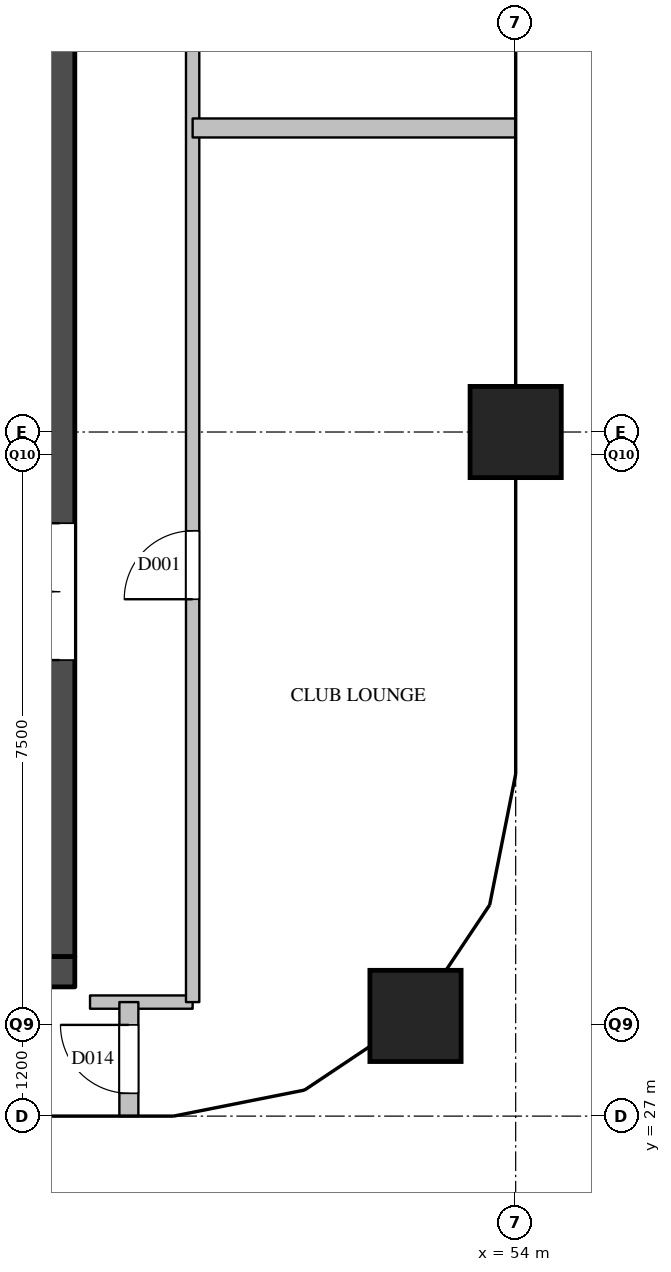
"""IFC4 building model, lengths in metres.
Left out: names, types, materials, properties, quantities, classifications, styles, units other than length and angle.
Written with IfcOpenShell. Run it as: python <this file> out.ifc"""

import sys

from ifc_helpers import new_model, si_unit, direction, frame, frame_2d, origin, origin_2d, place, context, subcontext, project, spatial, rectangle, extrude, element, fill, save


model = new_model("IFC4")
c1 = context("Model", 3, precision=1e-05, world=origin(), true_north=direction((0.0, 1.0)))
c2 = subcontext(c1, "Body", "Model", "MODEL_VIEW")
j1 = project(units=[si_unit("LENGTHUNIT", "METRE"), si_unit("PLANEANGLEUNIT", "RADIAN")], contexts=[c1])
p1 = place(None, origin())
s1 = spatial("IfcSite", under=j1, at=p1, CompositionType="ELEMENT")
p2 = place(p1, origin())
s2 = spatial("IfcBuilding", under=s1, at=p2, CompositionType="ELEMENT")
p3 = place(p2, frame((0.0, 0.0, 261.8)))
s3 = spatial("IfcBuildingStorey", under=s2, at=p3, CompositionType="ELEMENT", Elevation=261.8)
for number, where, z_axis, x_axis in (
    (1, (52.682, 28.318, 0.0), (0.0, 0.0, 1.0), (1.0, 0.0, 0.0)),
    (2, (54.0, 36.0, 0.0), (0.0, 0.0, 1.0), (1.0, 0.0, 0.0)),
):
    element("IfcColumn", number, at=place(p3, frame(where, z_axis=z_axis, x_axis=x_axis)), inside=s3, PredefinedType="COLUMN", context=c2, shape_type="SweptSolid", body=[
        extrude(rectangle(XDim=1.2, YDim=1.2, at=origin_2d()), origin(), (0.0, 0.0, 1.0), 3.9),
    ])
p4 = place(p3, frame((36.2, 28.9, 0.0), z_axis=(0.0, 0.0, 1.0), x_axis=(1.0, 0.0, 0.0)))
e3 = element("IfcWall", 3, at=p4, inside=s3, PredefinedType="SHEAR", context=c2, shape_type="SweptSolid", body=[
    extrude(rectangle(XDim=12.0, YDim=0.4, at=frame_2d((6.0, 0.0))), origin(), (0.0, 0.0, 1.0), 3.6),
])
p5 = place(p4, frame((0.85, 0.0, 0.0)))
e4 = element("IfcOpeningElement", 4, at=p5, cuts=e3, PredefinedType="OPENING", context=c2, shape_type="SweptSolid", body=[
    extrude(rectangle(XDim=1.2, YDim=2.1, at=frame_2d((0.6, 1.05))), frame((0.0, 0.21, 0.0), z_axis=(0.0, -1.0, 0.0), x_axis=(1.0, 0.0, 0.0)), (0.0, 0.0, 1.0), 0.42),
])
p6 = place(p4, frame((2.95, 0.0, 0.0)))
e5 = element("IfcOpeningElement", 5, at=p6, cuts=e3, PredefinedType="OPENING", context=c2, shape_type="SweptSolid", body=[
    extrude(rectangle(XDim=1.2, YDim=2.1, at=frame_2d((0.6, 1.05))), frame((0.0, 0.21, 0.0), z_axis=(0.0, -1.0, 0.0), x_axis=(1.0, 0.0, 0.0)), (0.0, 0.0, 1.0), 0.42),
])
p7 = place(p4, frame((5.05, 0.0, 0.0)))
e6 = element("IfcOpeningElement", 6, at=p7, cuts=e3, PredefinedType="OPENING", context=c2, shape_type="SweptSolid", body=[
    extrude(rectangle(XDim=1.2, YDim=2.1, at=frame_2d((0.6, 1.05))), frame((0.0, 0.21, 0.0), z_axis=(0.0, -1.0, 0.0), x_axis=(1.0, 0.0, 0.0)), (0.0, 0.0, 1.0), 0.42),
])
p8 = place(p3, frame((48.0, 29.1, 0.0), z_axis=(0.0, 0.0, 1.0), x_axis=(0.0, 1.0, 0.0)))
e7 = element("IfcWall", 7, at=p8, inside=s3, PredefinedType="SHEAR", context=c2, shape_type="SweptSolid", body=[
    extrude(rectangle(XDim=20.3, YDim=0.4, at=frame_2d((10.15, 0.0))), origin(), (0.0, 0.0, 1.0), 3.6),
])
p9 = place(p8, frame((12.5, 0.0, 0.0)))
e8 = element("IfcOpeningElement", 8, at=p9, cuts=e7, PredefinedType="OPENING", context=c2, shape_type="SweptSolid", body=[
    extrude(rectangle(XDim=0.7, YDim=2.1, at=frame_2d((0.35, 1.05))), frame((0.0, 0.21, 0.0), z_axis=(0.0, -1.0, 0.0), x_axis=(1.0, 0.0, 0.0)), (0.0, 0.0, 1.0), 0.42),
])
p10 = place(p8, frame((3.9, 0.0, 0.0)))
e9 = element("IfcOpeningElement", 9, at=p10, cuts=e7, PredefinedType="OPENING", context=c2, shape_type="SweptSolid", body=[
    extrude(rectangle(XDim=1.8, YDim=2.1, at=frame_2d((0.9, 1.05))), frame((0.0, 0.21, 0.0), z_axis=(0.0, -1.0, 0.0), x_axis=(1.0, 0.0, 0.0)), (0.0, 0.0, 1.0), 0.42),
])
p11 = place(p3, frame((48.4, 28.5, 0.0), z_axis=(0.0, 0.0, 1.0), x_axis=(1.0, 0.0, 0.0)))
e10 = element("IfcWall", 10, at=p11, inside=s3, PredefinedType="PARTITIONING", context=c2, shape_type="SweptSolid", body=[
    extrude(rectangle(XDim=1.35, YDim=0.175, at=frame_2d((0.675, 0.0))), origin(), (0.0, 0.0, 1.0), 3.6),
])
p12 = place(p3, frame((49.75, 28.5, 0.0), z_axis=(0.0, 0.0, 1.0), x_axis=(0.0, 1.0, 0.0)))
e11 = element("IfcWall", 11, at=p12, inside=s3, PredefinedType="PARTITIONING", context=c2, shape_type="SweptSolid", body=[
    extrude(rectangle(XDim=22.85, YDim=0.175, at=frame_2d((11.425, 0.0))), origin(), (0.0, 0.0, 1.0), 3.6),
])
p13 = place(p12, frame((5.3, 0.0, 0.0)))
e12 = element("IfcOpeningElement", 12, at=p13, cuts=e11, PredefinedType="OPENING", context=c2, shape_type="SweptSolid", body=[
    extrude(rectangle(XDim=0.9, YDim=2.1, at=frame_2d((0.45, 1.05))), frame((0.0, 0.097, 0.0), z_axis=(0.0, -1.0, 0.0), x_axis=(1.0, 0.0, 0.0)), (0.0, 0.0, 1.0), 0.195),
])
p14 = place(p12, frame((16.725, 0.0, 0.0)))
e13 = element("IfcOpeningElement", 13, at=p14, cuts=e11, PredefinedType="OPENING", context=c2, shape_type="SweptSolid", body=[
    extrude(rectangle(XDim=0.9, YDim=2.1, at=frame_2d((0.45, 1.05))), frame((0.0, 0.097, 0.0), z_axis=(0.0, -1.0, 0.0), x_axis=(1.0, 0.0, 0.0)), (0.0, 0.0, 1.0), 0.195),
])
p15 = place(p3, frame((49.75, 40.0, 0.0), z_axis=(0.0, 0.0, 1.0), x_axis=(1.0, 0.0, 0.0)))
e14 = element("IfcWall", 14, at=p15, inside=s3, PredefinedType="PARTITIONING", context=c2, shape_type="SweptSolid", body=[
    extrude(rectangle(XDim=4.25, YDim=0.25, at=frame_2d((2.125, 0.0))), origin(), (0.0, 0.0, 1.0), 2.6),
])
p16 = place(p3, frame((48.911, 27.0, 0.0), z_axis=(0.0, 0.0, 1.0), x_axis=(0.0, 1.0, 0.0)))
e15 = element("IfcWall", 15, at=p16, inside=s3, PredefinedType="PARTITIONING", context=c2, shape_type="SweptSolid", body=[
    extrude(rectangle(XDim=1.5, YDim=0.25, at=frame_2d((0.75, 0.0))), origin(), (0.0, 0.0, 1.0), 2.6),
])
p17 = place(p16, frame((0.3, 0.0, 0.0)))
e16 = element("IfcOpeningElement", 16, at=p17, cuts=e15, PredefinedType="OPENING", context=c2, shape_type="SweptSolid", body=[
    extrude(rectangle(XDim=0.9, YDim=2.1, at=frame_2d((0.45, 1.05))), frame((0.0, 0.135, 0.0), z_axis=(0.0, -1.0, 0.0), x_axis=(1.0, 0.0, 0.0)), (0.0, 0.0, 1.0), 0.27),
])
p18 = place(p10, origin())
e17 = element("IfcDoor", 17, at=p18, inside=s3, OperationType="DOUBLE_DOOR_SINGLE_SWING", PredefinedType="DOOR", context=c2, shape_type="SweptSolid", body=[
    extrude(rectangle(XDim=1.8, YDim=2.1, at=frame_2d((0.9, 1.05))), frame((0.0, 0.025, 0.0), z_axis=(0.0, -1.0, 0.0), x_axis=(1.0, 0.0, 0.0)), (0.0, 0.0, 1.0), 0.05),
])
fill(e9, e17)
p19 = place(p13, origin())
e18 = element("IfcDoor", 18, at=p19, inside=s3, OperationType="SINGLE_SWING_LEFT", PredefinedType="DOOR", context=c2, shape_type="SweptSolid", body=[
    extrude(rectangle(XDim=0.9, YDim=2.1, at=frame_2d((0.45, 1.05))), frame((0.0, 0.025, 0.0), z_axis=(0.0, -1.0, 0.0), x_axis=(1.0, 0.0, 0.0)), (0.0, 0.0, 1.0), 0.05),
])
fill(e12, e18)
p20 = place(p17, origin())
e19 = element("IfcDoor", 19, at=p20, inside=s3, OperationType="SINGLE_SWING_RIGHT", PredefinedType="DOOR", context=c2, shape_type="SweptSolid", body=[
    extrude(rectangle(XDim=0.9, YDim=2.1, at=frame_2d((0.45, 1.05))), frame((0.0, 0.025, 0.0), z_axis=(0.0, -1.0, 0.0), x_axis=(1.0, 0.0, 0.0)), (0.0, 0.0, 1.0), 0.05),
])
fill(e16, e19)
save(model, sys.argv[1])
